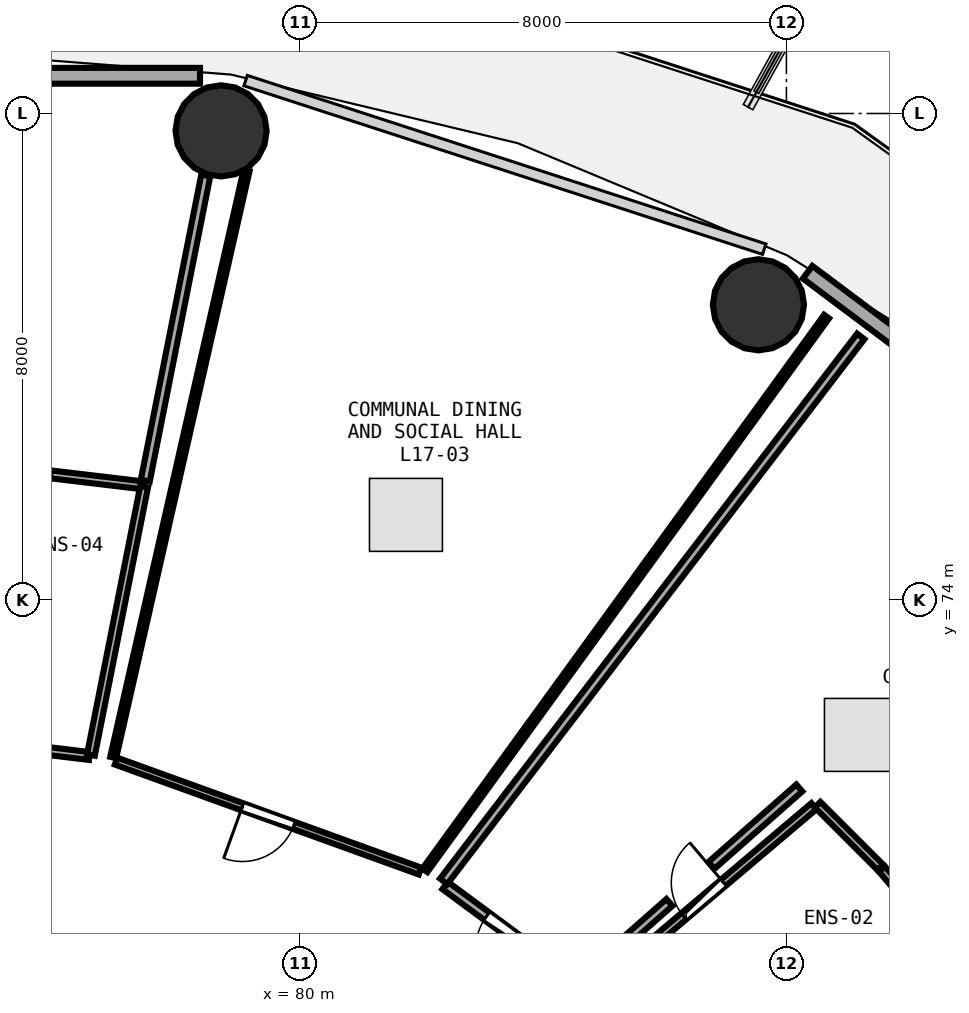
"""IFC4 building model, lengths in metres.
Left out: names, types, materials, properties, quantities, classifications, styles, units other than length and angle.
Written with IfcOpenShell. Run it as: python <this file> out.ifc"""

import sys

from ifc_helpers import new_model, si_unit, direction, frame, frame_2d, origin, origin_2d, place, context, subcontext, project, spatial, rectangle, circle, extrude, element, fill, save


model = new_model("IFC4")
c1 = context("Model", 3, precision=1e-05, world=origin(), true_north=direction((0.0, 1.0)))
c2 = subcontext(c1, "Body", "Model", "MODEL_VIEW")
j1 = project(units=[si_unit("LENGTHUNIT", "METRE"), si_unit("PLANEANGLEUNIT", "RADIAN")], contexts=[c1])
p1 = place(None, origin())
s1 = spatial("IfcSite", under=j1, at=p1, CompositionType="ELEMENT")
p2 = place(p1, origin())
s2 = spatial("IfcBuilding", under=s1, at=p2, CompositionType="ELEMENT")
p3 = place(p2, frame((0.0, 0.0, 67.5)))
s3 = spatial("IfcBuildingStorey", under=s2, at=p3, CompositionType="ELEMENT", Elevation=67.5)
for number, where, z_axis, x_axis in (
    (1, (87.54, 78.854, 0.0), (0.0, 0.0, 1.0), (1.0, 0.0, 0.0)),
    (2, (78.702, 81.714, 0.0), (0.0, 0.0, 1.0), (1.0, 0.0, 0.0)),
):
    element("IfcColumn", number, at=place(p3, frame(where, z_axis=z_axis, x_axis=x_axis)), inside=s3, PredefinedType="COLUMN", context=c2, shape_type="SweptSolid", body=[
        extrude(circle(Radius=0.75, at=origin_2d()), origin(), (0.0, 0.0, 1.0), 4.76),
    ])
p4 = place(p3, frame((94.984, 74.418, 0.0), z_axis=(0.0, 0.0, 1.0), x_axis=(-0.80030733173, 0.599590005569, 0.0)))
e3 = element("IfcWall", 3, at=p4, inside=s3, PredefinedType="SOLIDWALL", context=c2, shape_type="SweptSolid", body=[
    extrude(rectangle(XDim=8.291, YDim=0.26, at=frame_2d((4.145, 0.0))), origin(), (0.0, 0.0, 1.0), 4.345),
])
p5 = place(p4, frame((3.67, 0.0, 0.0)))
e4 = element("IfcOpeningElement", 4, at=p5, cuts=e3, PredefinedType="OPENING", context=c2, shape_type="SweptSolid", body=[
    extrude(rectangle(XDim=0.95, YDim=2.1, at=frame_2d((0.475, 1.05))), frame((0.0, 0.14, 0.0), z_axis=(0.0, -1.0, 0.0), x_axis=(1.0, 0.0, 0.0)), (0.0, 0.0, 1.0), 0.28),
])
p6 = place(p4, frame((4.97, 0.0, 0.85)))
e5 = element("IfcOpeningElement", 5, at=p6, cuts=e3, PredefinedType="OPENING", context=c2, shape_type="SweptSolid", body=[
    extrude(rectangle(XDim=1.2, YDim=1.45, at=frame_2d((0.6, 0.725))), frame((0.0, 0.14, 0.0), z_axis=(0.0, -1.0, 0.0), x_axis=(1.0, 0.0, 0.0)), (0.0, 0.0, 1.0), 0.28),
])
p7 = place(p3, frame((78.356, 82.62, 0.0), z_axis=(0.0, 0.0, 1.0), x_axis=(-1.0, 0.0, 0.0)))
e6 = element("IfcWall", 6, at=p7, inside=s3, PredefinedType="SOLIDWALL", context=c2, shape_type="SweptSolid", body=[
    extrude(rectangle(XDim=8.712, YDim=0.26, at=frame_2d((4.356, 0.0))), origin(), (0.0, 0.0, 1.0), 4.345),
])
p8 = place(p7, frame((3.556, 0.0, 0.85)))
e7 = element("IfcOpeningElement", 7, at=p8, cuts=e6, PredefinedType="OPENING", context=c2, shape_type="SweptSolid", body=[
    extrude(rectangle(XDim=1.6, YDim=1.45, at=frame_2d((0.8, 0.725))), frame((0.0, 0.14, 0.0), z_axis=(0.0, -1.0, 0.0), x_axis=(1.0, 0.0, 0.0)), (0.0, 0.0, 1.0), 0.28),
])
p9 = place(p3, frame((84.824, 67.539, 0.0), z_axis=(0.0, 0.0, 1.0), x_axis=(0.763460304027, 0.645854754705, 0.0)))
e8 = element("IfcWall", 8, at=p9, inside=s3, PredefinedType="PLUMBINGWALL", context=c2, shape_type="SweptSolid", body=[
    extrude(rectangle(XDim=4.754, YDim=0.13, at=frame_2d((2.377, 0.0))), origin(), (0.0, 0.0, 1.0), 4.045),
])
p10 = place(p9, frame((1.947, 0.0, 0.0)))
e9 = element("IfcOpeningElement", 9, at=p10, cuts=e8, PredefinedType="OPENING", context=c2, shape_type="SweptSolid", body=[
    extrude(rectangle(XDim=0.86, YDim=2.05, at=frame_2d((0.43, 1.025))), frame((0.0, 0.075, 0.0), z_axis=(0.0, -1.0, 0.0), x_axis=(1.0, 0.0, 0.0)), (0.0, 0.0, 1.0), 0.15),
])
p11 = place(p3, frame((84.518, 67.73, 0.0), z_axis=(0.0, 0.0, 1.0), x_axis=(-0.804204870708, 0.594352190144, 0.0)))
e10 = element("IfcWall", 10, at=p11, inside=s3, PredefinedType="PARTITIONING", context=c2, shape_type="SweptSolid", body=[
    extrude(rectangle(XDim=2.649, YDim=0.15, at=frame_2d((1.324, 0.0))), origin(), (0.0, 0.0, 1.0), 2.345),
])
p12 = place(p11, frame((0.85, 0.0, 0.0)))
e11 = element("IfcOpeningElement", 11, at=p12, cuts=e10, PredefinedType="OPENING", context=c2, shape_type="SweptSolid", body=[
    extrude(rectangle(XDim=0.95, YDim=2.08, at=frame_2d((0.475, 1.04))), frame((0.0, 0.085, 0.0), z_axis=(0.0, -1.0, 0.0), x_axis=(1.0, 0.0, 0.0)), (0.0, 0.0, 1.0), 0.17),
])
p13 = place(p3, frame((81.975, 69.542, 0.0), z_axis=(0.0, 0.0, 1.0), x_axis=(-0.940384663849, 0.340112751891, 0.0)))
e12 = element("IfcWall", 12, at=p13, inside=s3, PredefinedType="PARTITIONING", context=c2, shape_type="SweptSolid", body=[
    extrude(rectangle(XDim=5.316, YDim=0.12, at=frame_2d((2.658, 0.0))), origin(), (0.0, 0.0, 1.0), 2.345),
])
p14 = place(p13, frame((2.208, 0.0, 0.0)))
e13 = element("IfcOpeningElement", 13, at=p14, cuts=e12, PredefinedType="OPENING", context=c2, shape_type="SweptSolid", body=[
    extrude(rectangle(XDim=0.9, YDim=2.08, at=frame_2d((0.45, 1.04))), frame((0.0, 0.07, 0.0), z_axis=(0.0, -1.0, 0.0), x_axis=(1.0, 0.0, 0.0)), (0.0, 0.0, 1.0), 0.14),
])
p15 = place(p3, frame((86.524, 65.602, 0.0), z_axis=(0.0, 0.0, 1.0), x_axis=(0.863734985538, 0.503946301462, 0.0)))
e14 = element("IfcWall", 14, at=p15, inside=s3, PredefinedType="PARTITIONING", context=c2, shape_type="SweptSolid", body=[
    extrude(rectangle(XDim=11.897, YDim=0.15, at=frame_2d((5.949, 0.0))), origin(), (0.0, 0.0, 1.0), 2.345),
])
p16 = place(p3, frame((88.513, 70.634, 0.0), z_axis=(0.0, 0.0, 1.0), x_axis=(0.707441823433, -0.706771580114, 0.0)))
e15 = element("IfcWall", 15, at=p16, inside=s3, PredefinedType="PLUMBINGWALL", context=c2, shape_type="SweptSolid", body=[
    extrude(rectangle(XDim=1.457, YDim=0.13, at=frame_2d((0.729, 0.0))), origin(), (0.0, 0.0, 1.0), 2.345),
])
p17 = place(p3, frame((89.571, 69.575, 0.0), z_axis=(0.0, 0.0, 1.0), x_axis=(0.649398300051, -0.76044845183, 0.0)))
e16 = element("IfcWall", 16, at=p17, inside=s3, PredefinedType="PLUMBINGWALL", context=c2, shape_type="SweptSolid", body=[
    extrude(rectangle(XDim=1.444, YDim=0.13, at=frame_2d((0.722, 0.0))), origin(), (0.0, 0.0, 1.0), 2.345),
])
p18 = place(p3, frame((82.363, 69.372, 0.0), z_axis=(0.0, 0.0, 1.0), x_axis=(0.607772837178, 0.79411093582, 0.0)))
e17 = element("IfcWall", 17, at=p18, inside=s3, PredefinedType="PARTITIONING", context=c2, shape_type="SweptSolid", body=[
    extrude(rectangle(XDim=11.286, YDim=0.15, at=frame_2d((5.643, 0.0))), origin(), (0.0, 0.0, 1.0), 2.345),
])
p19 = place(p3, frame((88.212, 70.908, 0.0), z_axis=(0.0, 0.0, 1.0), x_axis=(-0.750129957485, -0.661290440641, 0.0)))
e18 = element("IfcWall", 18, at=p19, inside=s3, PredefinedType="PARTITIONING", context=c2, shape_type="SweptSolid", body=[
    extrude(rectangle(XDim=1.927, YDim=0.15, at=frame_2d((0.963, 0.0))), origin(), (0.0, 0.0, 1.0), 4.045),
])
p20 = place(p3, frame((86.077, 69.026, 0.0), z_axis=(0.0, 0.0, 1.0), x_axis=(-0.75011209805, -0.661310698809, 0.0)))
e19 = element("IfcWall", 19, at=p20, inside=s3, PredefinedType="PARTITIONING", context=c2, shape_type="SweptSolid", body=[
    extrude(rectangle(XDim=1.974, YDim=0.15, at=frame_2d((0.987, 0.0))), origin(), (0.0, 0.0, 1.0), 4.105),
])
p21 = place(p3, frame((76.928, 71.409, 0.0), z_axis=(0.0, 0.0, 1.0), x_axis=(0.221583796209, 0.975141333991, 0.0)))
e20 = element("IfcWall", 20, at=p21, inside=s3, PredefinedType="PARTITIONING", context=c2, shape_type="SweptSolid", body=[
    extrude(rectangle(XDim=9.9, YDim=0.1, at=frame_2d((4.95, 0.0))), origin(), (0.0, 0.0, 1.0), 2.345),
])
p22 = place(p3, frame((88.66, 78.66, 0.0), z_axis=(0.0, 0.0, 1.0), x_axis=(-0.587198342421, -0.809443084261, 0.0)))
e21 = element("IfcWall", 21, at=p22, inside=s3, PredefinedType="PARTITIONING", context=c2, shape_type="SweptSolid", body=[
    extrude(rectangle(XDim=11.25, YDim=0.1, at=frame_2d((5.625, 0.0))), origin(), (0.0, 0.0, 1.0), 2.345),
])
p23 = place(p3, frame((76.538, 71.433, 0.0), z_axis=(0.0, 0.0, 1.0), x_axis=(-0.992788120217, 0.119882227025, 0.0)))
e22 = element("IfcWall", 22, at=p23, inside=s3, PredefinedType="PLUMBINGWALL", context=c2, shape_type="SweptSolid", body=[
    extrude(rectangle(XDim=1.136, YDim=0.13, at=frame_2d((0.568, 0.0))), origin(), (0.0, 0.0, 1.0), 4.35),
])
p24 = place(p3, frame((75.89, 76.067, 0.0), z_axis=(0.0, 0.0, 1.0), x_axis=(0.993000658452, -0.118108815562, 0.0)))
e23 = element("IfcWall", 23, at=p24, inside=s3, PredefinedType="PLUMBINGWALL", context=c2, shape_type="SweptSolid", body=[
    extrude(rectangle(XDim=1.542, YDim=0.13, at=frame_2d((0.771, 0.0))), origin(), (0.0, 0.0, 1.0), 4.35),
])
p25 = place(p3, frame((77.437, 75.862, 0.0), z_axis=(0.0, 0.0, 1.0), x_axis=(-0.194550031261, -0.980892596229, 0.0)))
e24 = element("IfcWall", 24, at=p25, inside=s3, PredefinedType="PLUMBINGWALL", context=c2, shape_type="SweptSolid", body=[
    extrude(rectangle(XDim=4.498, YDim=0.13, at=frame_2d((2.249, 0.0))), origin(), (0.0, 0.0, 1.0), 4.045),
])
p26 = place(p3, frame((78.451, 80.981, 0.0), z_axis=(0.0, 0.0, 1.0), x_axis=(-0.194400268676, -0.980922288226, 0.0)))
e25 = element("IfcWall", 25, at=p26, inside=s3, PredefinedType="PARTITIONING", context=c2, shape_type="SweptSolid", body=[
    extrude(rectangle(XDim=5.118, YDim=0.15, at=frame_2d((2.559, 0.0))), origin(), (0.0, 0.0, 1.0), 2.345),
])
p27 = place(p10, origin())
e26 = element("IfcDoor", 26, at=p27, inside=s3, OperationType="SINGLE_SWING_RIGHT", PredefinedType="DOOR", context=c2, shape_type="SweptSolid", body=[
    extrude(rectangle(XDim=0.86, YDim=2.05, at=frame_2d((0.43, 1.025))), frame((0.0, 0.025, 0.0), z_axis=(0.0, -1.0, 0.0), x_axis=(1.0, 0.0, 0.0)), (0.0, 0.0, 1.0), 0.05),
])
fill(e9, e26)
p28 = place(p12, origin())
e27 = element("IfcDoor", 27, at=p28, inside=s3, OperationType="SINGLE_SWING_LEFT", PredefinedType="DOOR", context=c2, shape_type="SweptSolid", body=[
    extrude(rectangle(XDim=0.95, YDim=2.08, at=frame_2d((0.475, 1.04))), frame((0.0, 0.025, 0.0), z_axis=(0.0, -1.0, 0.0), x_axis=(1.0, 0.0, 0.0)), (0.0, 0.0, 1.0), 0.05),
])
fill(e11, e27)
p29 = place(p14, origin())
e28 = element("IfcDoor", 28, at=p29, inside=s3, OperationType="SINGLE_SWING_RIGHT", PredefinedType="DOOR", context=c2, shape_type="SweptSolid", body=[
    extrude(rectangle(XDim=0.9, YDim=2.08, at=frame_2d((0.45, 1.04))), frame((0.0, 0.025, 0.0), z_axis=(0.0, -1.0, 0.0), x_axis=(1.0, 0.0, 0.0)), (0.0, 0.0, 1.0), 0.05),
])
fill(e13, e28)
save(model, sys.argv[1])
